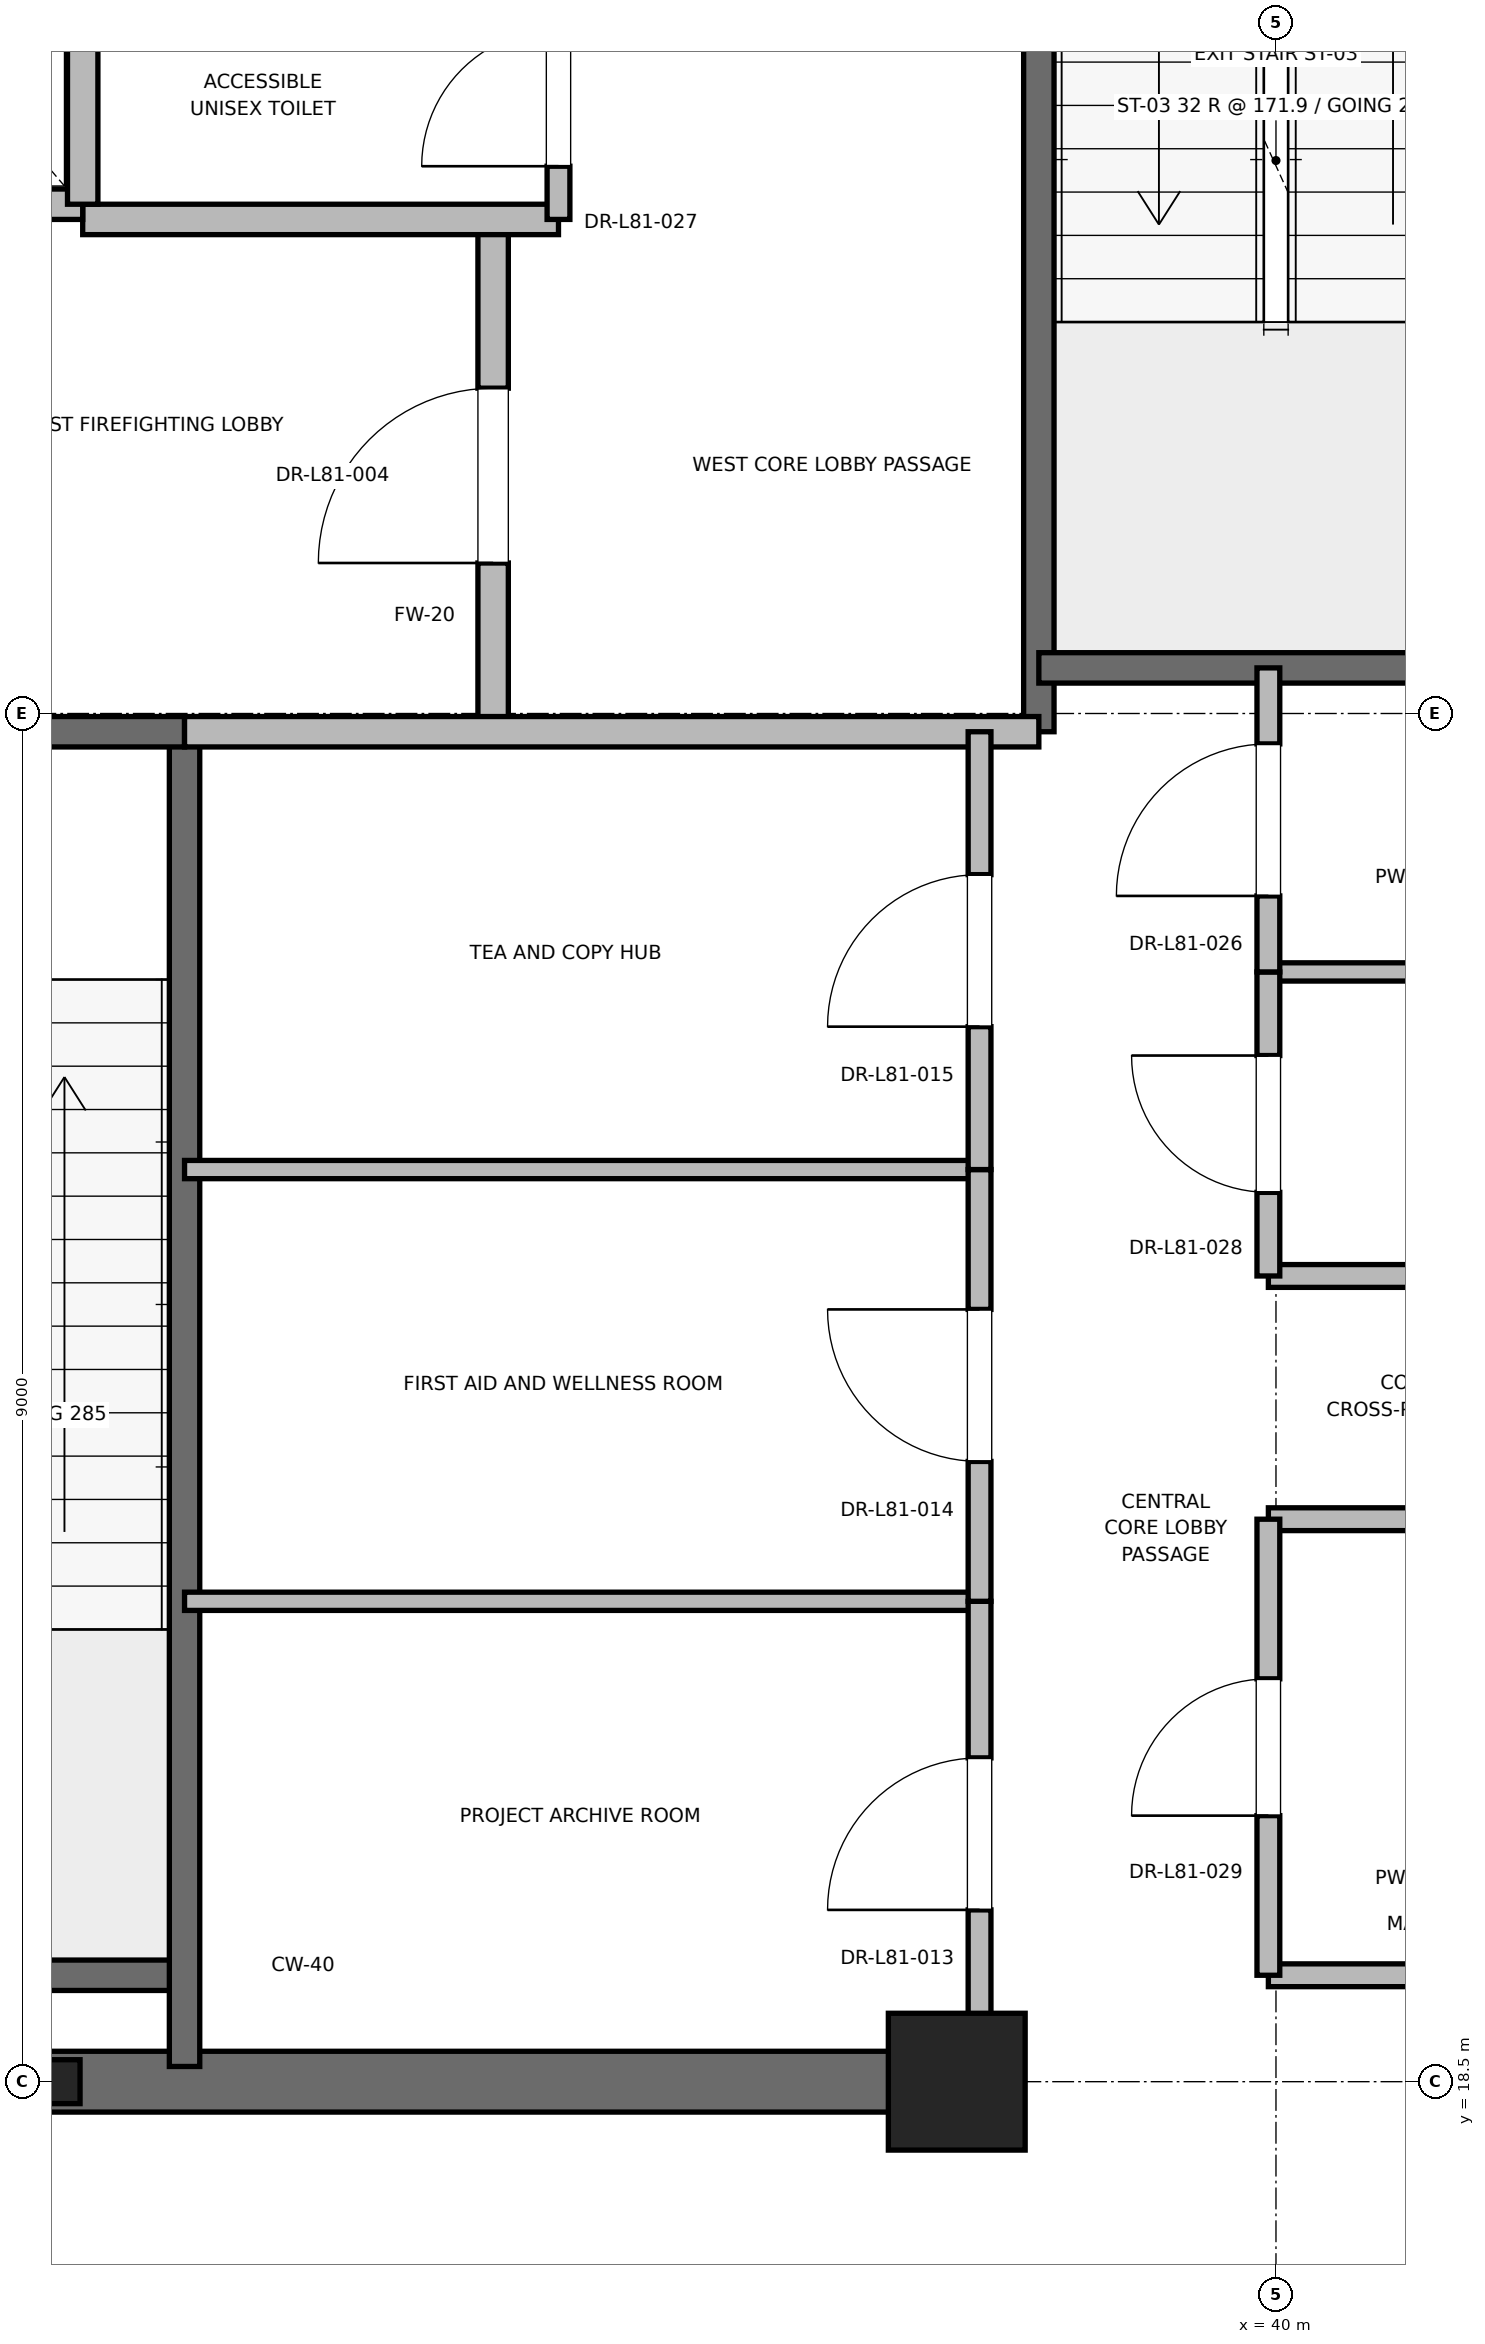
"""IFC4 building model, lengths in metres.
Left out: names, types, materials, properties, quantities, classifications, styles, units other than length and angle.
Written with IfcOpenShell. Run it as: python <this file> out.ifc"""

import sys

from ifc_helpers import new_model, si_unit, direction, frame, frame_2d, origin, origin_2d, place, context, subcontext, project, spatial, rectangle, i_section, extrude, element, fill, save


model = new_model("IFC4")
c1 = context("Model", 3, precision=1e-05, world=origin(), true_north=direction((0.0, 1.0)))
c2 = subcontext(c1, "Body", "Model", "MODEL_VIEW")
j1 = project(units=[si_unit("LENGTHUNIT", "METRE"), si_unit("PLANEANGLEUNIT", "RADIAN")], contexts=[c1])
p1 = place(None, origin())
s1 = spatial("IfcSite", under=j1, at=p1, CompositionType="ELEMENT")
p2 = place(p1, origin())
s2 = spatial("IfcBuilding", under=s1, at=p2, CompositionType="ELEMENT")
p3 = place(p2, frame((0.0, 0.0, 348.8)))
s3 = spatial("IfcBuildingStorey", under=s2, at=p3, CompositionType="ELEMENT", Elevation=348.8)
p4 = place(p3, frame((37.9, 18.5, 0.0), z_axis=(0.0, 0.0, 1.0), x_axis=(1.0, 0.0, 0.0)))
e1 = element("IfcColumn", 1, at=p4, inside=s3, PredefinedType="PILASTER", context=c2, shape_type="SweptSolid", body=[
    extrude(rectangle(XDim=0.9, YDim=0.9, at=origin_2d()), origin(), (0.0, 0.0, 1.0), 5.5),
])
p5 = place(p3, frame((32.0, 18.5, 0.0), z_axis=(0.0, 0.0, 1.0), x_axis=(1.0, 0.0, 0.0)))
e2 = element("IfcColumn", 2, at=p5, inside=s3, PredefinedType="COLUMN", context=c2, shape_type="SweptSolid", body=[
    extrude(i_section(OverallWidth=0.265, OverallDepth=0.289, WebThickness=0.019, FlangeThickness=0.032, FilletRadius=0.013, at=origin_2d()), origin(), (0.0, 0.0, 1.0), 5.5),
])
p6 = place(p3, frame((29.0, 18.5, 0.0), z_axis=(0.0, 0.0, 1.0), x_axis=(1.0, 0.0, 0.0)))
e3 = element("IfcWall", 3, at=p6, inside=s3, PredefinedType="SHEAR", context=c2, shape_type="SweptSolid", body=[
    extrude(rectangle(XDim=9.2, YDim=0.4, at=frame_2d((4.6, 0.0))), origin(), (0.0, 0.0, 1.0), 5.2),
])
p7 = place(p3, frame((29.7, 19.2, 0.0), z_axis=(0.0, 0.0, 1.0), x_axis=(1.0, 0.0, 0.0)))
e4 = element("IfcWall", 4, at=p7, inside=s3, PredefinedType="SOLIDWALL", context=c2, shape_type="SweptSolid", body=[
    extrude(rectangle(XDim=3.12, YDim=0.2, at=frame_2d((1.56, 0.0))), origin(), (0.0, 0.0, 1.0), 5.2),
])
p8 = place(p3, frame((32.82, 18.6, 0.0), z_axis=(0.0, 0.0, 1.0), x_axis=(0.0, 1.0, 0.0)))
e5 = element("IfcWall", 5, at=p8, inside=s3, PredefinedType="SOLIDWALL", context=c2, shape_type="SweptSolid", body=[
    extrude(rectangle(XDim=8.78, YDim=0.2, at=frame_2d((4.39, 0.0))), origin(), (0.0, 0.0, 1.0), 5.2),
])
p9 = place(p3, frame((29.7, 27.38, 0.0), z_axis=(0.0, 0.0, 1.0), x_axis=(1.0, 0.0, 0.0)))
e6 = element("IfcWall", 6, at=p9, inside=s3, PredefinedType="SOLIDWALL", context=c2, shape_type="SweptSolid", body=[
    extrude(rectangle(XDim=3.12, YDim=0.2, at=frame_2d((1.56, 0.0))), origin(), (0.0, 0.0, 1.0), 5.2),
])
p10 = place(p9, frame((1.01, 0.0, 0.0)))
e7 = element("IfcOpeningElement", 7, at=p10, cuts=e6, PredefinedType="OPENING", context=c2, shape_type="SweptSolid", body=[
    extrude(rectangle(XDim=1.1, YDim=2.15, at=frame_2d((0.55, 1.075))), frame((0.0, 0.1, 0.0), z_axis=(0.0, -1.0, 0.0), x_axis=(1.0, 0.0, 0.0)), (0.0, 0.0, 1.0), 0.2),
])
p11 = place(p3, frame((38.44, 27.38, 0.0), z_axis=(0.0, 0.0, 1.0), x_axis=(0.0, 1.0, 0.0)))
e8 = element("IfcWall", 8, at=p11, inside=s3, PredefinedType="SOLIDWALL", context=c2, shape_type="SweptSolid", body=[
    extrude(rectangle(XDim=8.87, YDim=0.2, at=frame_2d((4.435, 0.0))), origin(), (0.0, 0.0, 1.0), 5.2),
])
p12 = place(p3, frame((38.44, 27.8, 0.0), z_axis=(0.0, 0.0, 1.0), x_axis=(1.0, 0.0, 0.0)))
e9 = element("IfcWall", 9, at=p12, inside=s3, PredefinedType="SOLIDWALL", context=c2, shape_type="SweptSolid", body=[
    extrude(rectangle(XDim=3.32, YDim=0.2, at=frame_2d((1.66, 0.0))), origin(), (0.0, 0.0, 1.0), 5.2),
])
p13 = place(p3, frame((34.85, 27.38, 0.0), z_axis=(0.0, 0.0, 1.0), x_axis=(0.0, 1.0, 0.0)))
e10 = element("IfcWall", 10, at=p13, inside=s3, PredefinedType="PARTITIONING", context=c2, shape_type="SweptSolid", body=[
    extrude(rectangle(XDim=3.37, YDim=0.2, at=frame_2d((1.685, 0.0))), origin(), (0.0, 0.0, 1.0), 5.2),
])
p14 = place(p13, frame((1.11, 0.0, 0.0)))
e11 = element("IfcOpeningElement", 11, at=p14, cuts=e10, PredefinedType="OPENING", context=c2, shape_type="SweptSolid", body=[
    extrude(rectangle(XDim=1.15, YDim=2.2, at=frame_2d((0.575, 1.1))), frame((0.0, 0.1, 0.0), z_axis=(0.0, -1.0, 0.0), x_axis=(1.0, 0.0, 0.0)), (0.0, 0.0, 1.0), 0.2),
])
p15 = place(p3, frame((32.82, 27.38, 0.0), z_axis=(0.0, 0.0, 1.0), x_axis=(1.0, 0.0, 0.0)))
e12 = element("IfcWall", 12, at=p15, inside=s3, PredefinedType="PARTITIONING", context=c2, shape_type="SweptSolid", body=[
    extrude(rectangle(XDim=5.62, YDim=0.2, at=frame_2d((2.81, 0.0))), origin(), (0.0, 0.0, 1.0), 5.2),
])
p16 = place(p3, frame((32.15, 30.75, 0.0), z_axis=(0.0, 0.0, 1.0), x_axis=(1.0, 0.0, 0.0)))
e13 = element("IfcWall", 13, at=p16, inside=s3, PredefinedType="PARTITIONING", context=c2, shape_type="SweptSolid", body=[
    extrude(rectangle(XDim=3.13, YDim=0.2, at=frame_2d((1.565, 0.0))), origin(), (0.0, 0.0, 1.0), 5.2),
])
p17 = place(p3, frame((29.55, 30.85, 0.0), z_axis=(0.0, 0.0, 1.0), x_axis=(1.0, 0.0, 0.0)))
e14 = element("IfcWall", 14, at=p17, inside=s3, PredefinedType="SOLIDWALL", context=c2, shape_type="SweptSolid", body=[
    extrude(rectangle(XDim=2.6, YDim=0.2, at=frame_2d((1.3, 0.0))), origin(), (0.0, 0.0, 1.0), 4.28),
])
p18 = place(p17, frame((0.75, 0.0, 0.0)))
e15 = element("IfcOpeningElement", 15, at=p18, cuts=e14, PredefinedType="OPENING", context=c2, shape_type="SweptSolid", body=[
    extrude(rectangle(XDim=1.1, YDim=2.2, at=frame_2d((0.55, 1.1))), frame((0.0, 0.1, 0.0), z_axis=(0.0, -1.0, 0.0), x_axis=(1.0, 0.0, 0.0)), (0.0, 0.0, 1.0), 0.2),
])
p19 = place(p3, frame((32.15, 30.85, 0.0), z_axis=(0.0, 0.0, 1.0), x_axis=(0.0, 1.0, 0.0)))
e16 = element("IfcWall", 16, at=p19, inside=s3, PredefinedType="SOLIDWALL", context=c2, shape_type="SweptSolid", body=[
    extrude(rectangle(XDim=3.0, YDim=0.2, at=frame_2d((1.5, 0.0))), origin(), (0.0, 0.0, 1.0), 5.2),
])
for number, where, z_axis, x_axis in (
    (17, (39.95, 19.2, 0.0), (0.0, 0.0, 1.0), (1.0, 0.0, 0.0)),
    (18, (39.95, 22.2, 0.0), (0.0, 0.0, 1.0), (1.0, 0.0, 0.0)),
    (19, (39.95, 23.8, 0.0), (0.0, 0.0, 1.0), (1.0, 0.0, 0.0)),
):
    element("IfcWall", number, at=place(p3, frame(where, z_axis=z_axis, x_axis=x_axis)), inside=s3, PredefinedType="PARTITIONING", context=c2, shape_type="SweptSolid", body=[
        extrude(rectangle(XDim=1.81, YDim=0.15, at=frame_2d((0.905, 0.0))), origin(), (0.0, 0.0, 1.0), 2.85),
    ])
p20 = place(p3, frame((39.95, 25.8, 0.0), z_axis=(0.0, 0.0, 1.0), x_axis=(1.0, 0.0, 0.0)))
e20 = element("IfcWall", 20, at=p20, inside=s3, PredefinedType="PARTITIONING", context=c2, shape_type="SweptSolid", body=[
    extrude(rectangle(XDim=1.81, YDim=0.12, at=frame_2d((0.905, 0.0))), origin(), (0.0, 0.0, 1.0), 2.85),
])
p21 = place(p3, frame((39.95, 19.2, 0.0), z_axis=(0.0, 0.0, 1.0), x_axis=(0.0, 1.0, 0.0)))
e21 = element("IfcWall", 21, at=p21, inside=s3, PredefinedType="PARTITIONING", context=c2, shape_type="SweptSolid", body=[
    extrude(rectangle(XDim=3.0, YDim=0.15, at=frame_2d((1.5, 0.0))), origin(), (0.0, 0.0, 1.0), 2.85),
])
p22 = place(p21, frame((1.05, 0.0, 0.0)))
e22 = element("IfcOpeningElement", 22, at=p22, cuts=e21, PredefinedType="OPENING", context=c2, shape_type="SweptSolid", body=[
    extrude(rectangle(XDim=0.9, YDim=2.1, at=frame_2d((0.45, 1.05))), frame((0.0, 0.075, 0.0), z_axis=(0.0, -1.0, 0.0), x_axis=(1.0, 0.0, 0.0)), (0.0, 0.0, 1.0), 0.15),
])
p23 = place(p3, frame((39.95, 23.8, 0.0), z_axis=(0.0, 0.0, 1.0), x_axis=(0.0, 1.0, 0.0)))
e23 = element("IfcWall", 23, at=p23, inside=s3, PredefinedType="PARTITIONING", context=c2, shape_type="SweptSolid", body=[
    extrude(rectangle(XDim=2.0, YDim=0.15, at=frame_2d((1.0, 0.0))), origin(), (0.0, 0.0, 1.0), 2.85),
])
p24 = place(p23, frame((0.55, 0.0, 0.0)))
e24 = element("IfcOpeningElement", 24, at=p24, cuts=e23, PredefinedType="OPENING", context=c2, shape_type="SweptSolid", body=[
    extrude(rectangle(XDim=0.9, YDim=2.1, at=frame_2d((0.45, 1.05))), frame((0.0, 0.075, 0.0), z_axis=(0.0, -1.0, 0.0), x_axis=(1.0, 0.0, 0.0)), (0.0, 0.0, 1.0), 0.15),
])
p25 = place(p3, frame((39.95, 25.8, 0.0), z_axis=(0.0, 0.0, 1.0), x_axis=(0.0, 1.0, 0.0)))
e25 = element("IfcWall", 25, at=p25, inside=s3, PredefinedType="PARTITIONING", context=c2, shape_type="SweptSolid", body=[
    extrude(rectangle(XDim=2.0, YDim=0.15, at=frame_2d((1.0, 0.0))), origin(), (0.0, 0.0, 1.0), 2.85),
])
p26 = place(p25, frame((0.5, 0.0, 0.0)))
e26 = element("IfcOpeningElement", 26, at=p26, cuts=e25, PredefinedType="OPENING", context=c2, shape_type="SweptSolid", body=[
    extrude(rectangle(XDim=1.0, YDim=2.15, at=frame_2d((0.5, 1.075))), frame((0.0, 0.075, 0.0), z_axis=(0.0, -1.0, 0.0), x_axis=(1.0, 0.0, 0.0)), (0.0, 0.0, 1.0), 0.15),
])
p27 = place(p3, frame((35.28, 30.75, 0.0), z_axis=(0.0, 0.0, 1.0), x_axis=(0.0, 1.0, 0.0)))
e27 = element("IfcWall", 27, at=p27, inside=s3, PredefinedType="PARTITIONING", context=c2, shape_type="SweptSolid", body=[
    extrude(rectangle(XDim=1.6, YDim=0.15, at=frame_2d((0.8, 0.0))), origin(), (0.0, 0.0, 1.0), 2.85),
])
p28 = place(p27, frame((0.35, 0.0, 0.0)))
e28 = element("IfcOpeningElement", 28, at=p28, cuts=e27, PredefinedType="OPENING", context=c2, shape_type="SweptSolid", body=[
    extrude(rectangle(XDim=0.9, YDim=2.1, at=frame_2d((0.45, 1.05))), frame((0.0, 0.075, 0.0), z_axis=(0.0, -1.0, 0.0), x_axis=(1.0, 0.0, 0.0)), (0.0, 0.0, 1.0), 0.15),
])
for number, where, z_axis, x_axis in (
    (29, (32.82, 21.66, 0.0), (0.0, 0.0, 1.0), (1.0, 0.0, 0.0)),
    (30, (32.82, 24.5, 0.0), (0.0, 0.0, 1.0), (1.0, 0.0, 0.0)),
):
    element("IfcWall", number, at=place(p3, frame(where, z_axis=z_axis, x_axis=x_axis)), inside=s3, PredefinedType="PARTITIONING", context=c2, shape_type="SweptSolid", body=[
        extrude(rectangle(XDim=5.23, YDim=0.12, at=frame_2d((2.615, 0.0))), origin(), (0.0, 0.0, 1.0), 2.85),
    ])
p29 = place(p3, frame((38.05, 18.6, 0.0), z_axis=(0.0, 0.0, 1.0), x_axis=(0.0, 1.0, 0.0)))
e31 = element("IfcWall", 31, at=p29, inside=s3, PredefinedType="PARTITIONING", context=c2, shape_type="SweptSolid", body=[
    extrude(rectangle(XDim=3.06, YDim=0.15, at=frame_2d((1.53, 0.0))), origin(), (0.0, 0.0, 1.0), 2.85),
])
p30 = place(p29, frame((1.03, 0.0, 0.0)))
e32 = element("IfcOpeningElement", 32, at=p30, cuts=e31, PredefinedType="OPENING", context=c2, shape_type="SweptSolid", body=[
    extrude(rectangle(XDim=1.0, YDim=2.15, at=frame_2d((0.5, 1.075))), frame((0.0, 0.075, 0.0), z_axis=(0.0, -1.0, 0.0), x_axis=(1.0, 0.0, 0.0)), (0.0, 0.0, 1.0), 0.15),
])
p31 = place(p3, frame((38.05, 21.66, 0.0), z_axis=(0.0, 0.0, 1.0), x_axis=(0.0, 1.0, 0.0)))
e33 = element("IfcWall", 33, at=p31, inside=s3, PredefinedType="PARTITIONING", context=c2, shape_type="SweptSolid", body=[
    extrude(rectangle(XDim=2.84, YDim=0.15, at=frame_2d((1.42, 0.0))), origin(), (0.0, 0.0, 1.0), 2.85),
])
p32 = place(p31, frame((0.92, 0.0, 0.0)))
e34 = element("IfcOpeningElement", 34, at=p32, cuts=e33, PredefinedType="OPENING", context=c2, shape_type="SweptSolid", body=[
    extrude(rectangle(XDim=1.0, YDim=2.15, at=frame_2d((0.5, 1.075))), frame((0.0, 0.075, 0.0), z_axis=(0.0, -1.0, 0.0), x_axis=(1.0, 0.0, 0.0)), (0.0, 0.0, 1.0), 0.15),
])
p33 = place(p3, frame((38.05, 24.5, 0.0), z_axis=(0.0, 0.0, 1.0), x_axis=(0.0, 1.0, 0.0)))
e35 = element("IfcWall", 35, at=p33, inside=s3, PredefinedType="PARTITIONING", context=c2, shape_type="SweptSolid", body=[
    extrude(rectangle(XDim=2.88, YDim=0.15, at=frame_2d((1.44, 0.0))), origin(), (0.0, 0.0, 1.0), 2.85),
])
p34 = place(p33, frame((0.94, 0.0, 0.0)))
e36 = element("IfcOpeningElement", 36, at=p34, cuts=e35, PredefinedType="OPENING", context=c2, shape_type="SweptSolid", body=[
    extrude(rectangle(XDim=1.0, YDim=2.15, at=frame_2d((0.5, 1.075))), frame((0.0, 0.075, 0.0), z_axis=(0.0, -1.0, 0.0), x_axis=(1.0, 0.0, 0.0)), (0.0, 0.0, 1.0), 0.15),
])
p35 = place(p14, origin())
e37 = element("IfcDoor", 37, at=p35, inside=s3, OperationType="SINGLE_SWING_LEFT", PredefinedType="DOOR", context=c2, shape_type="SweptSolid", body=[
    extrude(rectangle(XDim=1.15, YDim=2.2, at=frame_2d((0.575, 1.1))), frame((0.0, 0.025, 0.0), z_axis=(0.0, -1.0, 0.0), x_axis=(1.0, 0.0, 0.0)), (0.0, 0.0, 1.0), 0.05),
])
fill(e11, e37)
p36 = place(p22, origin())
e38 = element("IfcDoor", 38, at=p36, inside=s3, OperationType="SINGLE_SWING_LEFT", PredefinedType="DOOR", context=c2, shape_type="SweptSolid", body=[
    extrude(rectangle(XDim=0.9, YDim=2.1, at=frame_2d((0.45, 1.05))), frame((0.0, 0.025, 0.0), z_axis=(0.0, -1.0, 0.0), x_axis=(1.0, 0.0, 0.0)), (0.0, 0.0, 1.0), 0.05),
])
fill(e22, e38)
p37 = place(p24, origin())
e39 = element("IfcDoor", 39, at=p37, inside=s3, OperationType="SINGLE_SWING_RIGHT", PredefinedType="DOOR", context=c2, shape_type="SweptSolid", body=[
    extrude(rectangle(XDim=0.9, YDim=2.1, at=frame_2d((0.45, 1.05))), frame((0.0, 0.025, 0.0), z_axis=(0.0, -1.0, 0.0), x_axis=(1.0, 0.0, 0.0)), (0.0, 0.0, 1.0), 0.05),
])
fill(e24, e39)
p38 = place(p26, origin())
e40 = element("IfcDoor", 40, at=p38, inside=s3, OperationType="SINGLE_SWING_LEFT", PredefinedType="DOOR", context=c2, shape_type="SweptSolid", body=[
    extrude(rectangle(XDim=1.0, YDim=2.15, at=frame_2d((0.5, 1.075))), frame((0.0, 0.025, 0.0), z_axis=(0.0, -1.0, 0.0), x_axis=(1.0, 0.0, 0.0)), (0.0, 0.0, 1.0), 0.05),
])
fill(e26, e40)
p39 = place(p28, origin())
e41 = element("IfcDoor", 41, at=p39, inside=s3, OperationType="SINGLE_SWING_LEFT", PredefinedType="DOOR", context=c2, shape_type="SweptSolid", body=[
    extrude(rectangle(XDim=0.9, YDim=2.1, at=frame_2d((0.45, 1.05))), frame((0.0, 0.025, 0.0), z_axis=(0.0, -1.0, 0.0), x_axis=(1.0, 0.0, 0.0)), (0.0, 0.0, 1.0), 0.05),
])
fill(e28, e41)
p40 = place(p30, origin())
e42 = element("IfcDoor", 42, at=p40, inside=s3, OperationType="SINGLE_SWING_LEFT", PredefinedType="DOOR", context=c2, shape_type="SweptSolid", body=[
    extrude(rectangle(XDim=1.0, YDim=2.15, at=frame_2d((0.5, 1.075))), frame((0.0, 0.025, 0.0), z_axis=(0.0, -1.0, 0.0), x_axis=(1.0, 0.0, 0.0)), (0.0, 0.0, 1.0), 0.05),
])
fill(e32, e42)
p41 = place(p32, origin())
e43 = element("IfcDoor", 43, at=p41, inside=s3, OperationType="SINGLE_SWING_RIGHT", PredefinedType="DOOR", context=c2, shape_type="SweptSolid", body=[
    extrude(rectangle(XDim=1.0, YDim=2.15, at=frame_2d((0.5, 1.075))), frame((0.0, 0.025, 0.0), z_axis=(0.0, -1.0, 0.0), x_axis=(1.0, 0.0, 0.0)), (0.0, 0.0, 1.0), 0.05),
])
fill(e34, e43)
p42 = place(p34, origin())
e44 = element("IfcDoor", 44, at=p42, inside=s3, OperationType="SINGLE_SWING_LEFT", PredefinedType="DOOR", context=c2, shape_type="SweptSolid", body=[
    extrude(rectangle(XDim=1.0, YDim=2.15, at=frame_2d((0.5, 1.075))), frame((0.0, 0.025, 0.0), z_axis=(0.0, -1.0, 0.0), x_axis=(1.0, 0.0, 0.0)), (0.0, 0.0, 1.0), 0.05),
])
fill(e36, e44)
save(model, sys.argv[1])
